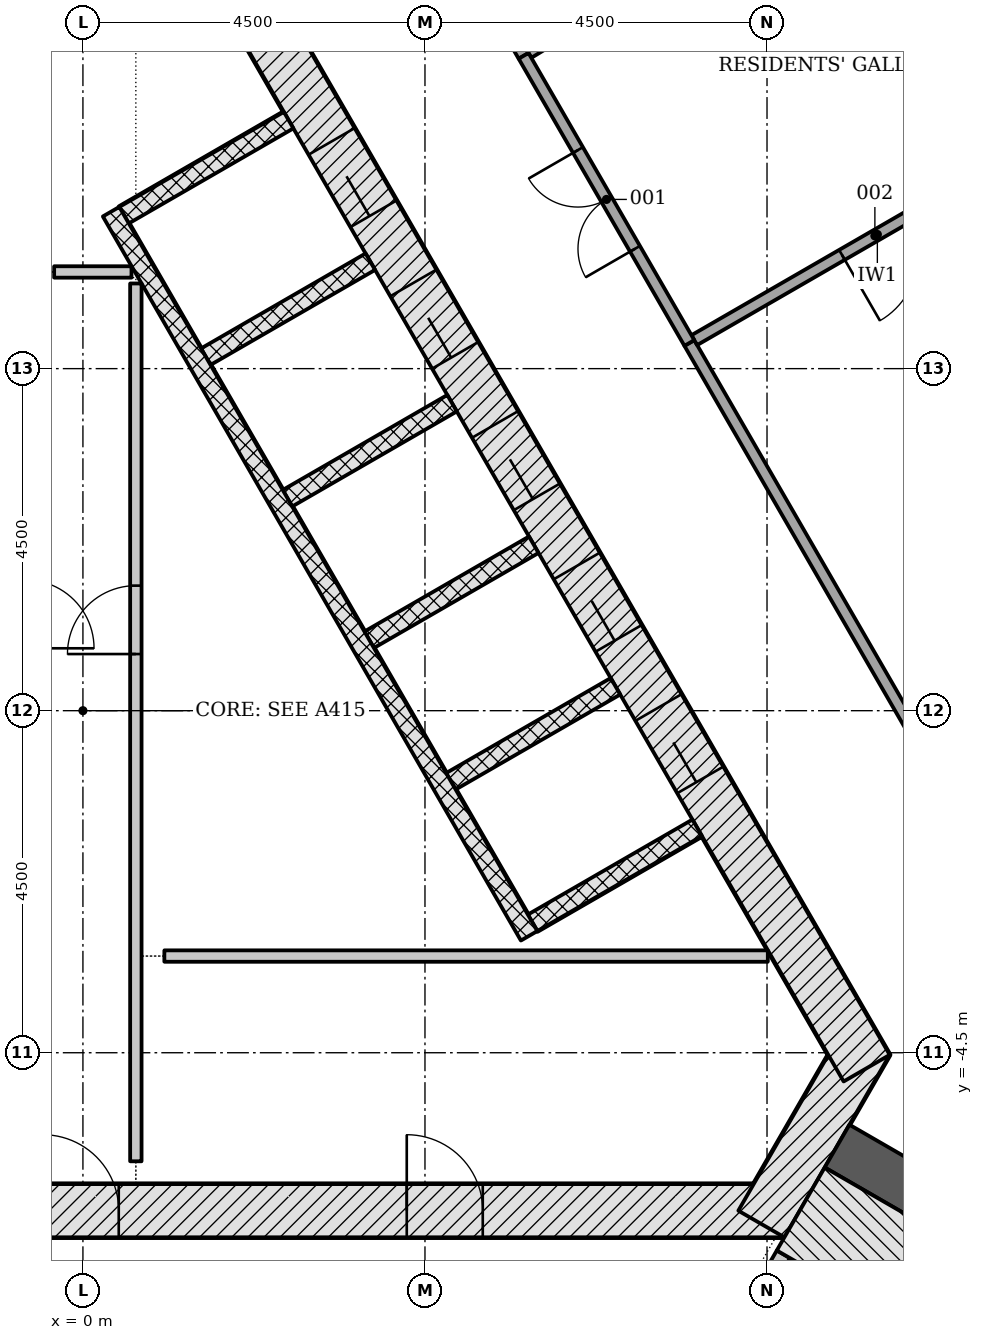
"""IFC4 building model, lengths in metres.
Left out: names, types, materials, properties, quantities, classifications, styles, units other than length and angle.
Written with IfcOpenShell. Run it as: python <this file> out.ifc"""

import sys

from ifc_helpers import new_model, si_unit, direction, frame, frame_2d, origin, place, context, subcontext, project, spatial, rectangle, extrude, element, fill, save


model = new_model("IFC4")
c1 = context("Model", 3, precision=1e-05, world=origin(), true_north=direction((0.0, 1.0)))
c2 = subcontext(c1, "Body", "Model", "MODEL_VIEW")
j1 = project(units=[si_unit("LENGTHUNIT", "METRE"), si_unit("PLANEANGLEUNIT", "RADIAN")], contexts=[c1])
p1 = place(None, origin())
s1 = spatial("IfcSite", under=j1, at=p1, CompositionType="ELEMENT")
p2 = place(p1, origin())
s2 = spatial("IfcBuilding", under=s1, at=p2, CompositionType="ELEMENT")
p3 = place(p2, frame((0.0, 0.0, 203.1)))
s3 = spatial("IfcBuildingStorey", under=s2, at=p3, CompositionType="ELEMENT", Elevation=203.1)
p4 = place(p3, frame((-9.229, -6.578, -0.2), z_axis=(0.0, 0.0, 1.0), x_axis=(1.0, 0.0, 0.0)))
e1 = element("IfcWall", 1, at=p4, inside=s3, PredefinedType="SHEAR", context=c2, shape_type="SweptSolid", body=[
    extrude(rectangle(XDim=18.458, YDim=0.7, at=frame_2d((9.229, 0.0))), origin(), (0.0, 0.0, 1.0), 3.6),
])
p5 = place(p4, frame((8.7, 0.0, 0.2)))
e2 = element("IfcOpeningElement", 2, at=p5, cuts=e1, PredefinedType="OPENING", context=c2, shape_type="SweptSolid", body=[
    extrude(rectangle(XDim=1.0, YDim=2.1, at=frame_2d((0.5, 1.05))), frame((0.0, 0.36, 0.0), z_axis=(0.0, -1.0, 0.0), x_axis=(1.0, 0.0, 0.0)), (0.0, 0.0, 1.0), 0.72),
])
p6 = place(p4, frame((3.99, 0.0, 0.2)))
e3 = element("IfcOpeningElement", 3, at=p6, cuts=e1, PredefinedType="OPENING", context=c2, shape_type="SweptSolid", body=[
    extrude(rectangle(XDim=0.9, YDim=2.1, at=frame_2d((0.45, 1.05))), frame((0.0, 0.36, 0.0), z_axis=(0.0, -1.0, 0.0), x_axis=(1.0, 0.0, 0.0)), (0.0, 0.0, 1.0), 0.72),
])
p7 = place(p4, frame((13.489, 0.0, 0.2)))
e4 = element("IfcOpeningElement", 4, at=p7, cuts=e1, PredefinedType="OPENING", context=c2, shape_type="SweptSolid", body=[
    extrude(rectangle(XDim=1.0, YDim=2.1, at=frame_2d((0.5, 1.05))), frame((0.0, 0.36, 0.0), z_axis=(0.0, -1.0, 0.0), x_axis=(1.0, 0.0, 0.0)), (0.0, 0.0, 1.0), 0.72),
])
p8 = place(p3, frame((8.926, -6.753, -0.2), z_axis=(0.0, 0.0, 1.0), x_axis=(0.500042739161, 0.866000726912, 0.0)))
e5 = element("IfcWall", 5, at=p8, inside=s3, PredefinedType="SHEAR", context=c2, shape_type="SweptSolid", body=[
    extrude(rectangle(XDim=2.771, YDim=0.7, at=frame_2d((1.386, 0.0))), origin(), (0.0, 0.0, 1.0), 3.6),
])
p9 = place(p3, frame((10.311, -4.703, -0.2), z_axis=(0.0, 0.0, 1.0), x_axis=(-0.500001446645, 0.866024568562, 0.0)))
e6 = element("IfcWall", 6, at=p9, inside=s3, PredefinedType="SHEAR", context=c2, shape_type="SweptSolid", body=[
    extrude(rectangle(XDim=18.458, YDim=0.7, at=frame_2d((9.229, 0.0))), origin(), (0.0, 0.0, 1.0), 3.6),
])
p10 = place(p9, frame((4.379, 0.0, 0.2)))
e7 = element("IfcOpeningElement", 7, at=p10, cuts=e6, PredefinedType="OPENING", context=c2, shape_type="SweptSolid", body=[
    extrude(rectangle(XDim=1.1, YDim=2.1, at=frame_2d((0.55, 1.05))), frame((0.0, 0.36, 0.0), z_axis=(0.0, -1.0, 0.0), x_axis=(1.0, 0.0, 0.0)), (0.0, 0.0, 1.0), 0.72),
])
p11 = place(p9, frame((6.529, 0.0, 0.2)))
e8 = element("IfcOpeningElement", 8, at=p11, cuts=e6, PredefinedType="OPENING", context=c2, shape_type="SweptSolid", body=[
    extrude(rectangle(XDim=1.1, YDim=2.1, at=frame_2d((0.55, 1.05))), frame((0.0, 0.36, 0.0), z_axis=(0.0, -1.0, 0.0), x_axis=(1.0, 0.0, 0.0)), (0.0, 0.0, 1.0), 0.72),
])
p12 = place(p9, frame((8.679, 0.0, 0.2)))
e9 = element("IfcOpeningElement", 9, at=p12, cuts=e6, PredefinedType="OPENING", context=c2, shape_type="SweptSolid", body=[
    extrude(rectangle(XDim=1.1, YDim=2.1, at=frame_2d((0.55, 1.05))), frame((0.0, 0.36, 0.0), z_axis=(0.0, -1.0, 0.0), x_axis=(1.0, 0.0, 0.0)), (0.0, 0.0, 1.0), 0.72),
])
p13 = place(p9, frame((10.829, 0.0, 0.2)))
e10 = element("IfcOpeningElement", 10, at=p13, cuts=e6, PredefinedType="OPENING", context=c2, shape_type="SweptSolid", body=[
    extrude(rectangle(XDim=1.1, YDim=2.1, at=frame_2d((0.55, 1.05))), frame((0.0, 0.36, 0.0), z_axis=(0.0, -1.0, 0.0), x_axis=(1.0, 0.0, 0.0)), (0.0, 0.0, 1.0), 0.72),
])
p14 = place(p9, frame((12.979, 0.0, 0.2)))
e11 = element("IfcOpeningElement", 11, at=p14, cuts=e6, PredefinedType="OPENING", context=c2, shape_type="SweptSolid", body=[
    extrude(rectangle(XDim=1.1, YDim=2.1, at=frame_2d((0.55, 1.05))), frame((0.0, 0.36, 0.0), z_axis=(0.0, -1.0, 0.0), x_axis=(1.0, 0.0, 0.0)), (0.0, 0.0, 1.0), 0.72),
])
p15 = place(p3, frame((9.922, -5.728, -0.2), z_axis=(0.0, 0.0, 1.0), x_axis=(0.866030064713, -0.499991926948, 0.0)))
e12 = element("IfcWall", 12, at=p15, inside=s3, PredefinedType="SHEAR", context=c2, shape_type="SweptSolid", body=[
    extrude(rectangle(XDim=8.758, YDim=0.65, at=frame_2d((4.379, 0.0))), origin(), (0.0, 0.0, 1.0), 3.6),
])
for number, where, z_axis, x_axis in (
    (13, (8.081, -1.541, -0.2), (0.0, 0.0, 1.0), (-0.866, -0.5, 0.0)),
    (14, (7.006, 0.321, -0.2), (0.0, 0.0, 1.0), (-0.866, -0.5, 0.0)),
):
    element("IfcWall", number, at=place(p3, frame(where, z_axis=z_axis, x_axis=x_axis)), inside=s3, PredefinedType="PARTITIONING", context=c2, shape_type="SweptSolid", body=[
        extrude(rectangle(XDim=2.5, YDim=0.25, at=frame_2d((1.25, 0.0))), origin(), (0.0, 0.0, 1.0), 3.6),
    ])
p16 = place(p3, frame((5.931, 2.183, -0.2), z_axis=(0.0, 0.0, 1.0), x_axis=(-0.866047370643, -0.499961950354, 0.0)))
e15 = element("IfcWall", 15, at=p16, inside=s3, PredefinedType="PARTITIONING", context=c2, shape_type="SweptSolid", body=[
    extrude(rectangle(XDim=2.5, YDim=0.25, at=frame_2d((1.25, 0.0))), origin(), (0.0, 0.0, 1.0), 3.6),
])
for number, where, z_axis, x_axis in (
    (16, (4.856, 4.045, -0.2), (0.0, 0.0, 1.0), (-0.866, -0.5, 0.0)),
    (17, (3.781, 5.907, -0.2), (0.0, 0.0, 1.0), (-0.866, -0.5, 0.0)),
    (18, (2.706, 7.769, -0.2), (0.0, 0.0, 1.0), (-0.866, -0.5, 0.0)),
):
    element("IfcWall", number, at=place(p3, frame(where, z_axis=z_axis, x_axis=x_axis)), inside=s3, PredefinedType="PARTITIONING", context=c2, shape_type="SweptSolid", body=[
        extrude(rectangle(XDim=2.5, YDim=0.25, at=frame_2d((1.25, 0.0))), origin(), (0.0, 0.0, 1.0), 3.6),
    ])
p17 = place(p3, frame((5.87, -2.961, 0.0), z_axis=(0.0, 0.0, 1.0), x_axis=(-0.50000615651, 0.866021849293, 0.0)))
e19 = element("IfcWall", 19, at=p17, inside=s3, PredefinedType="PARTITIONING", context=c2, shape_type="SweptSolid", body=[
    extrude(rectangle(XDim=11.0, YDim=0.25, at=frame_2d((5.5, 0.0))), origin(), (0.0, 0.0, 1.0), 3.4),
])
p18 = place(p3, frame((-0.379, 5.772, 0.0), z_axis=(0.0, 0.0, 1.0), x_axis=(1.0, 0.0, 0.0)))
e20 = element("IfcWall", 20, at=p18, inside=s3, PredefinedType="PARTITIONING", context=c2, shape_type="SweptSolid", body=[
    extrude(rectangle(XDim=1.018, YDim=0.15, at=frame_2d((0.509, 0.0))), origin(), (0.0, 0.0, 1.0), 3.4),
])
p19 = place(p3, frame((0.696, -5.928, 0.0), z_axis=(0.0, 0.0, 1.0), x_axis=(0.0, 1.0, 0.0)))
e21 = element("IfcWall", 21, at=p19, inside=s3, PredefinedType="PARTITIONING", context=c2, shape_type="SweptSolid", body=[
    extrude(rectangle(XDim=11.549, YDim=0.15, at=frame_2d((5.774, 0.0))), origin(), (0.0, 0.0, 1.0), 3.4),
])
p20 = place(p19, frame((6.673, 0.0, 0.0)))
e22 = element("IfcOpeningElement", 22, at=p20, cuts=e21, PredefinedType="OPENING", context=c2, shape_type="SweptSolid", body=[
    extrude(rectangle(XDim=0.9, YDim=2.1, at=frame_2d((0.45, 1.05))), frame((0.0, 0.085, 0.0), z_axis=(0.0, -1.0, 0.0), x_axis=(1.0, 0.0, 0.0)), (0.0, 0.0, 1.0), 0.17),
])
p21 = place(p3, frame((1.071, -3.228, 0.0), z_axis=(0.0, 0.0, 1.0), x_axis=(1.0, 0.0, 0.0)))
e23 = element("IfcWall", 23, at=p21, inside=s3, PredefinedType="PARTITIONING", context=c2, shape_type="SweptSolid", body=[
    extrude(rectangle(XDim=7.939, YDim=0.15, at=frame_2d((3.97, 0.0))), origin(), (0.0, 0.0, 1.0), 3.4),
])
p22 = place(p3, frame((7.44, -10.226, -0.2), z_axis=(0.0, 0.0, 1.0), x_axis=(0.500022077904, 0.866012656725, 0.0)))
e24 = element("IfcWall", 24, at=p22, inside=s3, PredefinedType="SHEAR", context=c2, shape_type="SweptSolid", body=[
    extrude(rectangle(XDim=3.55, YDim=0.2, at=frame_2d((1.775, 0.0))), origin(), (0.0, 0.0, 1.0), 3.6),
])
p23 = place(p22, frame((1.175, 0.0, 0.2)))
e25 = element("IfcOpeningElement", 25, at=p23, cuts=e24, PredefinedType="OPENING", context=c2, shape_type="SweptSolid", body=[
    extrude(rectangle(XDim=1.2, YDim=2.1, at=frame_2d((0.6, 1.05))), frame((0.0, 0.11, 0.0), z_axis=(0.0, -1.0, 0.0), x_axis=(1.0, 0.0, 0.0)), (0.0, 0.0, 1.0), 0.22),
])
p24 = place(p3, frame((9.444, -6.555, -0.2), z_axis=(0.0, 0.0, 1.0), x_axis=(0.866018442252, -0.500012057535, 0.0)))
e26 = element("IfcWall", 26, at=p24, inside=s3, PredefinedType="SHEAR", context=c2, shape_type="SweptSolid", body=[
    extrude(rectangle(XDim=7.2, YDim=1.261, at=frame_2d((3.6, 0.0))), origin(), (0.0, 0.0, 1.0), 3.6),
])
p25 = place(p3, frame((15.832, -8.765, 0.0), z_axis=(0.0, 0.0, 1.0), x_axis=(-0.499997377664, 0.866026917785, 0.0)))
e27 = element("IfcWall", 27, at=p25, inside=s3, PredefinedType="PARTITIONING", context=c2, shape_type="SweptSolid", body=[
    extrude(rectangle(XDim=15.707, YDim=0.15, at=frame_2d((7.854, 0.0))), origin(), (0.0, 0.0, 1.0), 2.852),
])
p26 = place(p3, frame((5.797, 8.615, 0.0), z_axis=(0.0, 0.0, 1.0), x_axis=(-0.499996172356, 0.866027613664, 0.0)))
e28 = element("IfcWall", 28, at=p26, inside=s3, PredefinedType="PARTITIONING", context=c2, shape_type="SweptSolid", body=[
    extrude(rectangle(XDim=3.166, YDim=0.15, at=frame_2d((1.583, 0.0))), origin(), (0.0, 0.0, 1.0), 3.4),
])
p27 = place(p3, frame((12.86, 7.656, 0.0), z_axis=(0.0, 0.0, 1.0), x_axis=(-0.866013784358, -0.500020124897, 0.0)))
e29 = element("IfcWall", 29, at=p27, inside=s3, PredefinedType="PARTITIONING", context=c2, shape_type="SweptSolid", body=[
    extrude(rectangle(XDim=5.561, YDim=0.15, at=frame_2d((2.781, 0.0))), origin(), (0.0, 0.0, 1.0), 3.4),
])
p28 = place(p27, frame((2.318, 0.0, 0.0)))
e30 = element("IfcOpeningElement", 30, at=p28, cuts=e29, PredefinedType="OPENING", context=c2, shape_type="SweptSolid", body=[
    extrude(rectangle(XDim=1.0, YDim=2.1, at=frame_2d((0.5, 1.05))), frame((0.0, 0.085, 0.0), z_axis=(0.0, -1.0, 0.0), x_axis=(1.0, 0.0, 0.0)), (0.0, 0.0, 1.0), 0.17),
])
p29 = place(p3, frame((10.571, 11.512, 0.0), z_axis=(0.0, 0.0, 1.0), x_axis=(-0.854873861195, -0.518835890668, 0.0)))
e31 = element("IfcWall", 31, at=p29, inside=s3, PredefinedType="PARTITIONING", context=c2, shape_type="SweptSolid", body=[
    extrude(rectangle(XDim=5.509, YDim=0.15, at=frame_2d((2.755, 0.0))), origin(), (0.0, 0.0, 1.0), 3.4),
])
p30 = place(p29, frame((2.292, 0.0, 0.0)))
e32 = element("IfcOpeningElement", 32, at=p30, cuts=e31, PredefinedType="OPENING", context=c2, shape_type="SweptSolid", body=[
    extrude(rectangle(XDim=1.0, YDim=2.1, at=frame_2d((0.5, 1.05))), frame((0.0, 0.085, 0.0), z_axis=(0.0, -1.0, 0.0), x_axis=(1.0, 0.0, 0.0)), (0.0, 0.0, 1.0), 0.17),
])
p31 = place(p3, frame((7.979, 4.837, 0.0), z_axis=(0.0, 0.0, 1.0), x_axis=(-0.500027674414, 0.866009425365, 0.0)))
e33 = element("IfcWall", 33, at=p31, inside=s3, PredefinedType="PARTITIONING", context=c2, shape_type="SweptSolid", body=[
    extrude(rectangle(XDim=4.362, YDim=0.15, at=frame_2d((2.181, 0.0))), origin(), (0.0, 0.0, 1.0), 2.852),
])
p32 = place(p31, frame((1.431, 0.0, 0.0)))
e34 = element("IfcOpeningElement", 34, at=p32, cuts=e33, PredefinedType="OPENING", context=c2, shape_type="SweptSolid", body=[
    extrude(rectangle(XDim=1.5, YDim=2.1, at=frame_2d((0.75, 1.05))), frame((0.0, 0.085, 0.0), z_axis=(0.0, -1.0, 0.0), x_axis=(1.0, 0.0, 0.0)), (0.0, 0.0, 1.0), 0.17),
])
p33 = place(p10, origin())
e35 = element("IfcDoor", 35, at=p33, inside=s3, OperationType="DOUBLE_DOOR_SLIDING", PredefinedType="DOOR", context=c2, shape_type="SweptSolid", body=[
    extrude(rectangle(XDim=1.1, YDim=2.1, at=frame_2d((0.55, 1.05))), frame((0.0, 0.025, 0.0), z_axis=(0.0, -1.0, 0.0), x_axis=(1.0, 0.0, 0.0)), (0.0, 0.0, 1.0), 0.05),
])
fill(e7, e35)
p34 = place(p11, origin())
e36 = element("IfcDoor", 36, at=p34, inside=s3, OperationType="DOUBLE_DOOR_SLIDING", PredefinedType="DOOR", context=c2, shape_type="SweptSolid", body=[
    extrude(rectangle(XDim=1.1, YDim=2.1, at=frame_2d((0.55, 1.05))), frame((0.0, 0.025, 0.0), z_axis=(0.0, -1.0, 0.0), x_axis=(1.0, 0.0, 0.0)), (0.0, 0.0, 1.0), 0.05),
])
fill(e8, e36)
p35 = place(p12, origin())
e37 = element("IfcDoor", 37, at=p35, inside=s3, OperationType="DOUBLE_DOOR_SLIDING", PredefinedType="DOOR", context=c2, shape_type="SweptSolid", body=[
    extrude(rectangle(XDim=1.1, YDim=2.1, at=frame_2d((0.55, 1.05))), frame((0.0, 0.025, 0.0), z_axis=(0.0, -1.0, 0.0), x_axis=(1.0, 0.0, 0.0)), (0.0, 0.0, 1.0), 0.05),
])
fill(e9, e37)
p36 = place(p13, origin())
e38 = element("IfcDoor", 38, at=p36, inside=s3, OperationType="DOUBLE_DOOR_SLIDING", PredefinedType="DOOR", context=c2, shape_type="SweptSolid", body=[
    extrude(rectangle(XDim=1.1, YDim=2.1, at=frame_2d((0.55, 1.05))), frame((0.0, 0.025, 0.0), z_axis=(0.0, -1.0, 0.0), x_axis=(1.0, 0.0, 0.0)), (0.0, 0.0, 1.0), 0.05),
])
fill(e10, e38)
p37 = place(p14, origin())
e39 = element("IfcDoor", 39, at=p37, inside=s3, OperationType="DOUBLE_DOOR_SLIDING", PredefinedType="DOOR", context=c2, shape_type="SweptSolid", body=[
    extrude(rectangle(XDim=1.1, YDim=2.1, at=frame_2d((0.55, 1.05))), frame((0.0, 0.025, 0.0), z_axis=(0.0, -1.0, 0.0), x_axis=(1.0, 0.0, 0.0)), (0.0, 0.0, 1.0), 0.05),
])
fill(e11, e39)
p38 = place(p5, origin())
e40 = element("IfcDoor", 40, at=p38, inside=s3, OperationType="SINGLE_SWING_LEFT", PredefinedType="DOOR", context=c2, shape_type="SweptSolid", body=[
    extrude(rectangle(XDim=1.0, YDim=2.1, at=frame_2d((0.5, 1.05))), frame((0.0, 0.075, 0.0), z_axis=(0.0, -1.0, 0.0), x_axis=(1.0, 0.0, 0.0)), (0.0, 0.0, 1.0), 0.15),
])
fill(e2, e40)
p39 = place(p7, origin())
e41 = element("IfcDoor", 41, at=p39, inside=s3, OperationType="SINGLE_SWING_LEFT", PredefinedType="DOOR", context=c2, shape_type="SweptSolid", body=[
    extrude(rectangle(XDim=1.0, YDim=2.1, at=frame_2d((0.5, 1.05))), frame((0.0, 0.075, 0.0), z_axis=(0.0, -1.0, 0.0), x_axis=(1.0, 0.0, 0.0)), (0.0, 0.0, 1.0), 0.15),
])
fill(e4, e41)
p40 = place(p20, origin())
e42 = element("IfcDoor", 42, at=p40, inside=s3, OperationType="SINGLE_SWING_LEFT", PredefinedType="DOOR", context=c2, shape_type="SweptSolid", body=[
    extrude(rectangle(XDim=0.9, YDim=2.1, at=frame_2d((0.45, 1.05))), frame((0.0, 0.025, 0.0), z_axis=(0.0, -1.0, 0.0), x_axis=(1.0, 0.0, 0.0)), (0.0, 0.0, 1.0), 0.05),
])
fill(e22, e42)
p41 = place(p32, origin())
e43 = element("IfcDoor", 43, at=p41, inside=s3, OperationType="DOUBLE_DOOR_SINGLE_SWING", PredefinedType="DOOR", context=c2, shape_type="SweptSolid", body=[
    extrude(rectangle(XDim=1.5, YDim=2.1, at=frame_2d((0.75, 1.05))), frame((0.0, 0.025, 0.0), z_axis=(0.0, -1.0, 0.0), x_axis=(1.0, 0.0, 0.0)), (0.0, 0.0, 1.0), 0.05),
])
fill(e34, e43)
p42 = place(p28, origin())
e44 = element("IfcDoor", 44, at=p42, inside=s3, OperationType="SINGLE_SWING_RIGHT", PredefinedType="DOOR", context=c2, shape_type="SweptSolid", body=[
    extrude(rectangle(XDim=1.0, YDim=2.1, at=frame_2d((0.5, 1.05))), frame((0.0, 0.025, 0.0), z_axis=(0.0, -1.0, 0.0), x_axis=(1.0, 0.0, 0.0)), (0.0, 0.0, 1.0), 0.05),
])
fill(e30, e44)
save(model, sys.argv[1])
